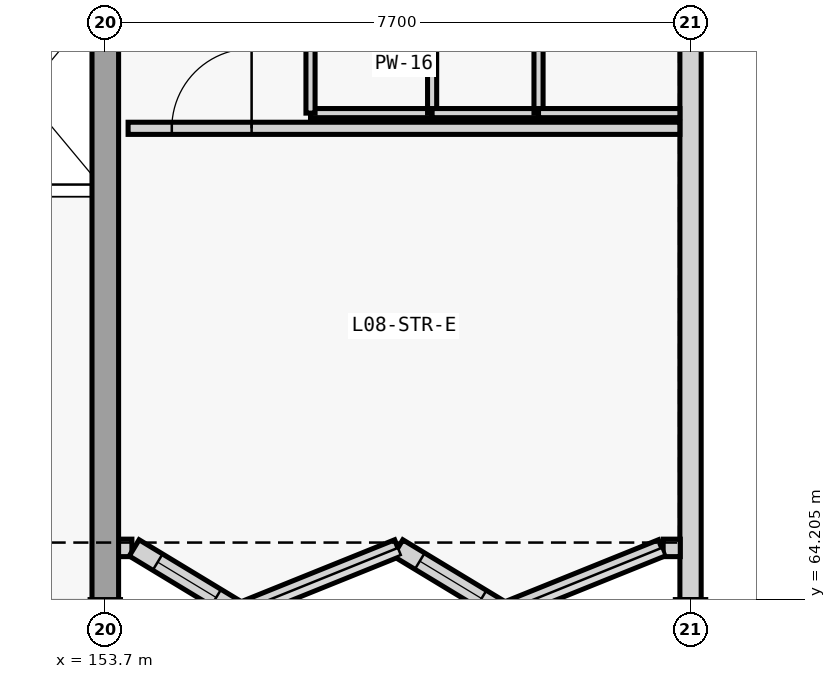
"""IFC4 building model, lengths in metres.
Left out: names, types, materials, properties, quantities, classifications, styles, units other than length and angle.
Written with IfcOpenShell. Run it as: python <this file> out.ifc"""

import sys

from ifc_helpers import new_model, si_unit, direction, frame, frame_2d, origin, place, context, subcontext, project, spatial, rectangle, extrude, element, fill, save


model = new_model("IFC4")
c1 = context("Model", 3, precision=1e-05, world=origin(), true_north=direction((0.0, 1.0)))
c2 = subcontext(c1, "Body", "Model", "MODEL_VIEW")
j1 = project(units=[si_unit("LENGTHUNIT", "METRE"), si_unit("PLANEANGLEUNIT", "RADIAN")], contexts=[c1])
p1 = place(None, origin())
s1 = spatial("IfcSite", under=j1, at=p1, CompositionType="ELEMENT")
p2 = place(p1, origin())
s2 = spatial("IfcBuilding", under=s1, at=p2, CompositionType="ELEMENT")
p3 = place(p2, frame((0.0, 0.0, 32.4)))
s3 = spatial("IfcBuildingStorey", under=s2, at=p3, CompositionType="ELEMENT", Elevation=32.4)
p4 = place(p3, frame((161.4, 96.802, 0.0), z_axis=(0.0, 0.0, 1.0), x_axis=(0.0, -1.0, 0.0)))
e1 = element("IfcWall", 1, at=p4, inside=s3, PredefinedType="SOLIDWALL", context=c2, shape_type="SweptSolid", body=[
    extrude(rectangle(XDim=32.604, YDim=0.28, at=frame_2d((16.302, 0.0))), origin(), (0.0, 0.0, 1.0), 2.8),
])
p5 = place(p4, frame((17.502, 0.0, 0.82)))
e2 = element("IfcOpeningElement", 2, at=p5, cuts=e1, PredefinedType="OPENING", context=c2, shape_type="SweptSolid", body=[
    extrude(rectangle(XDim=4.6, YDim=1.6, at=frame_2d((2.3, 0.8))), frame((0.0, 0.15, 0.0), z_axis=(0.0, -1.0, 0.0), x_axis=(1.0, 0.0, 0.0)), (0.0, 0.0, 1.0), 0.3),
])
p6 = place(p3, frame((154.05, 64.88, 0.0), z_axis=(0.0, 0.0, 1.0), x_axis=(-1.0, 0.0, 0.0)))
e3 = element("IfcWall", 3, at=p6, inside=s3, PredefinedType="SOLIDWALL", context=c2, shape_type="SweptSolid", body=[
    extrude(rectangle(XDim=0.18, YDim=0.23, at=frame_2d((0.09, 0.0))), origin(), (0.0, 0.0, 1.0), 3.36),
])
p7 = place(p3, frame((161.265, 64.88, 0.0), z_axis=(0.0, 0.0, 1.0), x_axis=(-1.0, 0.0, 0.0)))
e4 = element("IfcWall", 4, at=p7, inside=s3, PredefinedType="SOLIDWALL", context=c2, shape_type="SweptSolid", body=[
    extrude(rectangle(XDim=0.225, YDim=0.23, at=frame_2d((0.112, 0.0))), origin(), (0.0, 0.0, 1.0), 3.36),
])
p8 = place(p3, frame((155.468, 64.04, 0.0), z_axis=(0.0, 0.0, 1.0), x_axis=(-0.855561475997, 0.51770122734, 0.0)))
e5 = element("IfcWall", 5, at=p8, inside=s3, PredefinedType="SOLIDWALL", context=c2, shape_type="SweptSolid", body=[
    extrude(rectangle(XDim=1.622, YDim=0.25, at=frame_2d((0.811, 0.0))), origin(), (0.0, 0.0, 1.0), 3.36),
])
p9 = place(p8, frame((0.361, 0.0, 0.82)))
e6 = element("IfcOpeningElement", 6, at=p9, cuts=e5, PredefinedType="OPENING", context=c2, shape_type="SweptSolid", body=[
    extrude(rectangle(XDim=0.9, YDim=1.45, at=frame_2d((0.45, 0.725))), frame((0.0, 0.135, 0.0), z_axis=(0.0, -1.0, 0.0), x_axis=(1.0, 0.0, 0.0)), (0.0, 0.0, 1.0), 0.27),
])
p10 = place(p3, frame((157.55, 64.88, 0.0), z_axis=(0.0, 0.0, 1.0), x_axis=(-0.927392797001, -0.374089026933, 0.0)))
e7 = element("IfcWall", 7, at=p10, inside=s3, PredefinedType="SOLIDWALL", context=c2, shape_type="SweptSolid", body=[
    extrude(rectangle(XDim=2.245, YDim=0.23, at=frame_2d((1.123, 0.0))), origin(), (0.0, 0.0, 1.0), 3.36),
])
p11 = place(p3, frame((158.938, 64.04, 0.0), z_axis=(0.0, 0.0, 1.0), x_axis=(-0.855561475997, 0.51770122734, 0.0)))
e8 = element("IfcWall", 8, at=p11, inside=s3, PredefinedType="SOLIDWALL", context=c2, shape_type="SweptSolid", body=[
    extrude(rectangle(XDim=1.622, YDim=0.25, at=frame_2d((0.811, 0.0))), origin(), (0.0, 0.0, 1.0), 3.36),
])
p12 = place(p11, frame((0.336, 0.0, 0.82)))
e9 = element("IfcOpeningElement", 9, at=p12, cuts=e8, PredefinedType="OPENING", context=c2, shape_type="SweptSolid", body=[
    extrude(rectangle(XDim=0.95, YDim=1.5, at=frame_2d((0.475, 0.75))), frame((0.0, 0.135, 0.0), z_axis=(0.0, -1.0, 0.0), x_axis=(1.0, 0.0, 0.0)), (0.0, 0.0, 1.0), 0.27),
])
p13 = place(p3, frame((161.02, 64.88, 0.0), z_axis=(0.0, 0.0, 1.0), x_axis=(-0.927392797001, -0.374089026933, 0.0)))
e10 = element("IfcWall", 10, at=p13, inside=s3, PredefinedType="SOLIDWALL", context=c2, shape_type="SweptSolid", body=[
    extrude(rectangle(XDim=2.245, YDim=0.23, at=frame_2d((1.123, 0.0))), origin(), (0.0, 0.0, 1.0), 3.36),
])
p14 = place(p3, frame((153.7, 64.0, 0.0), z_axis=(0.0, 0.0, 1.0), x_axis=(0.0, 1.0, 0.0)))
e11 = element("IfcWall", 11, at=p14, inside=s3, PredefinedType="SHEAR", context=c2, shape_type="SweptSolid", body=[
    extrude(rectangle(XDim=8.4, YDim=0.35, at=frame_2d((4.2, 0.0))), origin(), (0.0, 0.0, 1.0), 3.6),
])
p15 = place(p3, frame((156.4, 70.6, 0.0), z_axis=(0.0, 0.0, 1.0), x_axis=(1.0, 0.0, 0.0)))
e12 = element("IfcWall", 12, at=p15, inside=s3, PredefinedType="PARTITIONING", context=c2, shape_type="SweptSolid", body=[
    extrude(rectangle(XDim=1.6, YDim=0.12, at=frame_2d((0.8, 0.0))), origin(), (0.0, 0.0, 1.0), 3.34),
])
p16 = place(p3, frame((156.4, 70.6, 0.0), z_axis=(0.0, 0.0, 1.0), x_axis=(0.0, 1.0, 0.0)))
e13 = element("IfcWall", 13, at=p16, inside=s3, PredefinedType="PARTITIONING", context=c2, shape_type="SweptSolid", body=[
    extrude(rectangle(XDim=5.2, YDim=0.12, at=frame_2d((2.6, 0.0))), origin(), (0.0, 0.0, 1.0), 3.34),
])
p17 = place(p16, frame((2.16, 0.0, 0.0)))
e14 = element("IfcOpeningElement", 14, at=p17, cuts=e13, PredefinedType="OPENING", context=c2, shape_type="SweptSolid", body=[
    extrude(rectangle(XDim=0.88, YDim=2.1, at=frame_2d((0.44, 1.05))), frame((0.0, 0.07, 0.0), z_axis=(0.0, -1.0, 0.0), x_axis=(1.0, 0.0, 0.0)), (0.0, 0.0, 1.0), 0.14),
])
p18 = place(p3, frame((158.0, 70.6, 0.0), z_axis=(0.0, 0.0, 1.0), x_axis=(0.0, 1.0, 0.0)))
e15 = element("IfcWall", 15, at=p18, inside=s3, PredefinedType="PARTITIONING", context=c2, shape_type="SweptSolid", body=[
    extrude(rectangle(XDim=5.2, YDim=0.12, at=frame_2d((2.6, 0.0))), origin(), (0.0, 0.0, 1.0), 3.34),
])
p19 = place(p3, frame((158.0, 70.6, 0.0), z_axis=(0.0, 0.0, 1.0), x_axis=(1.0, 0.0, 0.0)))
e16 = element("IfcWall", 16, at=p19, inside=s3, PredefinedType="PARTITIONING", context=c2, shape_type="SweptSolid", body=[
    extrude(rectangle(XDim=1.4, YDim=0.12, at=frame_2d((0.7, 0.0))), origin(), (0.0, 0.0, 1.0), 3.34),
])
p20 = place(p3, frame((159.4, 70.6, 0.0), z_axis=(0.0, 0.0, 1.0), x_axis=(0.0, 1.0, 0.0)))
e17 = element("IfcWall", 17, at=p20, inside=s3, PredefinedType="PARTITIONING", context=c2, shape_type="SweptSolid", body=[
    extrude(rectangle(XDim=5.2, YDim=0.12, at=frame_2d((2.6, 0.0))), origin(), (0.0, 0.0, 1.0), 3.34),
])
p21 = place(p3, frame((159.4, 70.6, 0.0), z_axis=(0.0, 0.0, 1.0), x_axis=(1.0, 0.0, 0.0)))
e18 = element("IfcWall", 18, at=p21, inside=s3, PredefinedType="PARTITIONING", context=c2, shape_type="SweptSolid", body=[
    extrude(rectangle(XDim=1.86, YDim=0.12, at=frame_2d((0.93, 0.0))), origin(), (0.0, 0.0, 1.0), 3.34),
])
p22 = place(p3, frame((154.0, 70.4, 0.0), z_axis=(0.0, 0.0, 1.0), x_axis=(1.0, 0.0, 0.0)))
e19 = element("IfcWall", 19, at=p22, inside=s3, PredefinedType="PARTITIONING", context=c2, shape_type="SweptSolid", body=[
    extrude(rectangle(XDim=7.26, YDim=0.16, at=frame_2d((3.63, 0.0))), origin(), (0.0, 0.0, 1.0), 3.34),
])
p23 = place(p22, frame((0.575, 0.0, 0.0)))
e20 = element("IfcOpeningElement", 20, at=p23, cuts=e19, PredefinedType="OPENING", context=c2, shape_type="SweptSolid", body=[
    extrude(rectangle(XDim=1.05, YDim=2.15, at=frame_2d((0.525, 1.075))), frame((0.0, 0.09, 0.0), z_axis=(0.0, -1.0, 0.0), x_axis=(1.0, 0.0, 0.0)), (0.0, 0.0, 1.0), 0.18),
])
p24 = place(p9, origin())
e21 = element("IfcWindow", 21, at=p24, inside=s3, PartitioningType="SINGLE_PANEL", PredefinedType="WINDOW", context=c2, shape_type="SweptSolid", body=[
    extrude(rectangle(XDim=0.9, YDim=1.45, at=frame_2d((0.45, 0.725))), frame((0.0, 0.03, 0.0), z_axis=(0.0, -1.0, 0.0), x_axis=(1.0, 0.0, 0.0)), (0.0, 0.0, 1.0), 0.06),
])
fill(e6, e21)
p25 = place(p12, origin())
e22 = element("IfcWindow", 22, at=p25, inside=s3, PartitioningType="SINGLE_PANEL", PredefinedType="WINDOW", context=c2, shape_type="SweptSolid", body=[
    extrude(rectangle(XDim=0.95, YDim=1.5, at=frame_2d((0.475, 0.75))), frame((0.0, 0.03, 0.0), z_axis=(0.0, -1.0, 0.0), x_axis=(1.0, 0.0, 0.0)), (0.0, 0.0, 1.0), 0.06),
])
fill(e9, e22)
p26 = place(p23, origin())
e23 = element("IfcDoor", 23, at=p26, inside=s3, OperationType="SINGLE_SWING_RIGHT", PredefinedType="DOOR", context=c2, shape_type="SweptSolid", body=[
    extrude(rectangle(XDim=1.05, YDim=2.15, at=frame_2d((0.525, 1.075))), frame((0.0, 0.025, 0.0), z_axis=(0.0, -1.0, 0.0), x_axis=(1.0, 0.0, 0.0)), (0.0, 0.0, 1.0), 0.05),
])
fill(e20, e23)
save(model, sys.argv[1])
